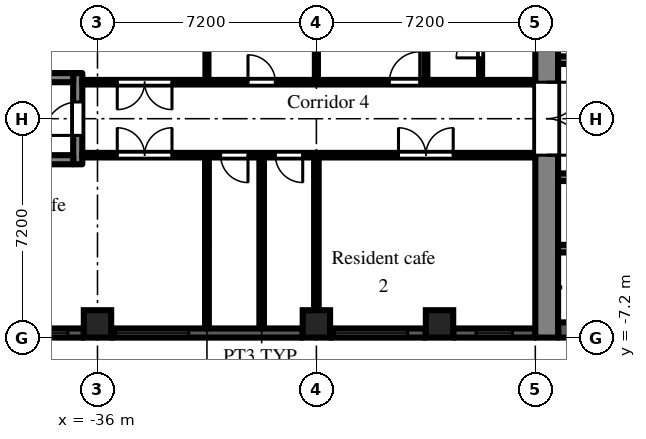
"""IFC4 building model, lengths in metres.
Left out: names, types, materials, properties, quantities, classifications, styles, units other than length and angle.
Written with IfcOpenShell. Run it as: python <this file> out.ifc"""

import sys

from ifc_helpers import new_model, si_unit, direction, frame, frame_2d, origin, origin_2d, place, context, subcontext, project, spatial, rectangle, extrude, element, fill, save


model = new_model("IFC4")
c1 = context("Model", 3, precision=1e-05, world=origin(), true_north=direction((0.0, 1.0)))
c2 = subcontext(c1, "Body", "Model", "MODEL_VIEW")
j1 = project(units=[si_unit("LENGTHUNIT", "METRE"), si_unit("PLANEANGLEUNIT", "RADIAN")], contexts=[c1])
p1 = place(None, origin())
s1 = spatial("IfcSite", under=j1, at=p1, CompositionType="ELEMENT")
p2 = place(p1, origin())
s2 = spatial("IfcBuilding", under=s1, at=p2, CompositionType="ELEMENT")
p3 = place(p2, frame((0.0, 0.0, 35.7)))
s3 = spatial("IfcBuildingStorey", under=s2, at=p3, CompositionType="ELEMENT", Elevation=35.7)
for number, where, z_axis, x_axis in (
    (1, (-36.0, -6.75, 0.0), (0.0, 0.0, 1.0), (1.0, 0.0, 0.0)),
    (2, (-28.8, -6.75, 0.0), (0.0, 0.0, 1.0), (1.0, 0.0, 0.0)),
    (3, (-24.75, -6.75, 0.0), (0.0, 0.0, 1.0), (1.0, 0.0, 0.0)),
):
    element("IfcColumn", number, at=place(p3, frame(where, z_axis=z_axis, x_axis=x_axis)), inside=s3, PredefinedType="COLUMN", context=c2, shape_type="SweptSolid", body=[
        extrude(rectangle(XDim=0.9, YDim=0.9, at=origin_2d()), origin(), (0.0, 0.0, 1.0), 3.0),
    ])
p4 = place(p3, frame((-38.7, -7.05, 0.0), z_axis=(0.0, 0.0, 1.0), x_axis=(1.0, 0.0, 0.0)))
e4 = element("IfcWall", 4, at=p4, inside=s3, PredefinedType="SOLIDWALL", context=c2, shape_type="SweptSolid", body=[
    extrude(rectangle(XDim=2.25, YDim=0.3, at=frame_2d((1.125, 0.0))), origin(), (0.0, 0.0, 1.0), 2.1),
])
p5 = place(p4, frame((0.525, 0.0, 0.2)))
e5 = element("IfcOpeningElement", 5, at=p5, cuts=e4, PredefinedType="OPENING", context=c2, shape_type="SweptSolid", body=[
    extrude(rectangle(XDim=1.2, YDim=1.85, at=frame_2d((0.6, 0.925))), frame((0.0, 0.16, 0.0), z_axis=(0.0, -1.0, 0.0), x_axis=(1.0, 0.0, 0.0)), (0.0, 0.0, 1.0), 0.32),
])
p6 = place(p3, frame((-35.55, -7.05, 0.0), z_axis=(0.0, 0.0, 1.0), x_axis=(1.0, 0.0, 0.0)))
e6 = element("IfcWall", 6, at=p6, inside=s3, PredefinedType="SOLIDWALL", context=c2, shape_type="SweptSolid", body=[
    extrude(rectangle(XDim=6.3, YDim=0.3, at=frame_2d((3.15, 0.0))), origin(), (0.0, 0.0, 1.0), 2.1),
])
p7 = place(p6, frame((0.15, 0.0, 0.2)))
e7 = element("IfcOpeningElement", 7, at=p7, cuts=e6, PredefinedType="OPENING", context=c2, shape_type="SweptSolid", body=[
    extrude(rectangle(XDim=2.4, YDim=1.85, at=frame_2d((1.2, 0.925))), frame((0.0, 0.16, 0.0), z_axis=(0.0, -1.0, 0.0), x_axis=(1.0, 0.0, 0.0)), (0.0, 0.0, 1.0), 0.32),
])
p8 = place(p3, frame((-28.35, -7.05, 0.0), z_axis=(0.0, 0.0, 1.0), x_axis=(1.0, 0.0, 0.0)))
e8 = element("IfcWall", 8, at=p8, inside=s3, PredefinedType="SOLIDWALL", context=c2, shape_type="SweptSolid", body=[
    extrude(rectangle(XDim=3.15, YDim=0.3, at=frame_2d((1.575, 0.0))), origin(), (0.0, 0.0, 1.0), 2.1),
])
p9 = place(p8, frame((0.15, 0.0, 0.2)))
e9 = element("IfcOpeningElement", 9, at=p9, cuts=e8, PredefinedType="OPENING", context=c2, shape_type="SweptSolid", body=[
    extrude(rectangle(XDim=2.4, YDim=1.85, at=frame_2d((1.2, 0.925))), frame((0.0, 0.16, 0.0), z_axis=(0.0, -1.0, 0.0), x_axis=(1.0, 0.0, 0.0)), (0.0, 0.0, 1.0), 0.32),
])
p10 = place(p3, frame((-24.3, -7.05, 0.0), z_axis=(0.0, 0.0, 1.0), x_axis=(1.0, 0.0, 0.0)))
e10 = element("IfcWall", 10, at=p10, inside=s3, PredefinedType="SOLIDWALL", context=c2, shape_type="SweptSolid", body=[
    extrude(rectangle(XDim=2.7, YDim=0.3, at=frame_2d((1.35, 0.0))), origin(), (0.0, 0.0, 1.0), 2.1),
])
p11 = place(p10, frame((0.75, 0.0, 0.2)))
e11 = element("IfcOpeningElement", 11, at=p11, cuts=e10, PredefinedType="OPENING", context=c2, shape_type="SweptSolid", body=[
    extrude(rectangle(XDim=1.2, YDim=1.85, at=frame_2d((0.6, 0.925))), frame((0.0, 0.16, 0.0), z_axis=(0.0, -1.0, 0.0), x_axis=(1.0, 0.0, 0.0)), (0.0, 0.0, 1.0), 0.32),
])
p12 = place(p3, frame((-21.225, -7.2, 0.0), z_axis=(0.0, 0.0, 1.0), x_axis=(0.0, 1.0, 0.0)))
e12 = element("IfcWall", 12, at=p12, inside=s3, PredefinedType="SHEAR", context=c2, shape_type="SweptSolid", body=[
    extrude(rectangle(XDim=14.4, YDim=0.75, at=frame_2d((7.2, 0.0))), origin(), (0.0, 0.0, 1.0), 2.575),
])
p13 = place(p12, frame((6.0, 0.0, 0.0)))
e13 = element("IfcOpeningElement", 13, at=p13, cuts=e12, PredefinedType="OPENING", context=c2, shape_type="SweptSolid", body=[
    extrude(rectangle(XDim=2.4, YDim=2.2, at=frame_2d((1.2, 1.1))), frame((0.0, 0.385, 0.0), z_axis=(0.0, -1.0, 0.0), x_axis=(1.0, 0.0, 0.0)), (0.0, 0.0, 1.0), 0.77),
])
p14 = place(p3, frame((-7.9, 1.925, 0.0), z_axis=(0.0, 0.0, 1.0), x_axis=(-1.0, 0.0, 0.0)))
e14 = element("IfcWall", 14, at=p14, inside=s3, PredefinedType="SHEAR", context=c2, shape_type="SweptSolid", body=[
    extrude(rectangle(XDim=12.95, YDim=0.25, at=frame_2d((6.475, 0.0))), origin(), (0.0, 0.0, 1.0), 2.575),
])
p15 = place(p14, frame((0.525, 0.0, 0.0)))
e15 = element("IfcOpeningElement", 15, at=p15, cuts=e14, PredefinedType="OPENING", context=c2, shape_type="SweptSolid", body=[
    extrude(rectangle(XDim=0.9, YDim=2.1, at=frame_2d((0.45, 1.05))), frame((0.0, 0.135, 0.0), z_axis=(0.0, -1.0, 0.0), x_axis=(1.0, 0.0, 0.0)), (0.0, 0.0, 1.0), 0.27),
])
p16 = place(p14, frame((2.625, 0.0, 0.0)))
e16 = element("IfcOpeningElement", 16, at=p16, cuts=e14, PredefinedType="OPENING", context=c2, shape_type="SweptSolid", body=[
    extrude(rectangle(XDim=1.1, YDim=2.1, at=frame_2d((0.55, 1.05))), frame((0.0, 0.135, 0.0), z_axis=(0.0, -1.0, 0.0), x_axis=(1.0, 0.0, 0.0)), (0.0, 0.0, 1.0), 0.27),
])
p17 = place(p14, frame((7.125, 0.0, 0.0)))
e17 = element("IfcOpeningElement", 17, at=p17, cuts=e14, PredefinedType="OPENING", context=c2, shape_type="SweptSolid", body=[
    extrude(rectangle(XDim=0.9, YDim=2.1, at=frame_2d((0.45, 1.05))), frame((0.0, 0.135, 0.0), z_axis=(0.0, -1.0, 0.0), x_axis=(1.0, 0.0, 0.0)), (0.0, 0.0, 1.0), 0.27),
])
p18 = place(p3, frame((-7.9, -6.95, 0.0), z_axis=(0.0, 0.0, 1.0), x_axis=(-1.0, 0.0, 0.0)))
e18 = element("IfcWall", 18, at=p18, inside=s3, PredefinedType="SHEAR", context=c2, shape_type="SweptSolid", body=[
    extrude(rectangle(XDim=12.95, YDim=0.5, at=frame_2d((6.475, 0.0))), origin(), (0.0, 0.0, 1.0), 2.575),
])
p19 = place(p3, frame((-7.9, -1.925, 0.0), z_axis=(0.0, 0.0, 1.0), x_axis=(-1.0, 0.0, 0.0)))
e19 = element("IfcWall", 19, at=p19, inside=s3, PredefinedType="SHEAR", context=c2, shape_type="SweptSolid", body=[
    extrude(rectangle(XDim=12.95, YDim=0.25, at=frame_2d((6.475, 0.0))), origin(), (0.0, 0.0, 1.0), 2.575),
])
p20 = place(p19, frame((4.825, 0.0, 0.0)))
e20 = element("IfcOpeningElement", 20, at=p20, cuts=e19, PredefinedType="OPENING", context=c2, shape_type="SweptSolid", body=[
    extrude(rectangle(XDim=1.1, YDim=2.1, at=frame_2d((0.55, 1.05))), frame((0.0, 0.135, 0.0), z_axis=(0.0, -1.0, 0.0), x_axis=(1.0, 0.0, 0.0)), (0.0, 0.0, 1.0), 0.27),
])
p21 = place(p19, frame((7.025, 0.0, 0.0)))
e21 = element("IfcOpeningElement", 21, at=p21, cuts=e19, PredefinedType="OPENING", context=c2, shape_type="SweptSolid", body=[
    extrude(rectangle(XDim=1.1, YDim=2.1, at=frame_2d((0.55, 1.05))), frame((0.0, 0.135, 0.0), z_axis=(0.0, -1.0, 0.0), x_axis=(1.0, 0.0, 0.0)), (0.0, 0.0, 1.0), 0.27),
])
p22 = place(p19, frame((9.225, 0.0, 0.0)))
e22 = element("IfcOpeningElement", 22, at=p22, cuts=e19, PredefinedType="OPENING", context=c2, shape_type="SweptSolid", body=[
    extrude(rectangle(XDim=1.1, YDim=2.1, at=frame_2d((0.55, 1.05))), frame((0.0, 0.135, 0.0), z_axis=(0.0, -1.0, 0.0), x_axis=(1.0, 0.0, 0.0)), (0.0, 0.0, 1.0), 0.27),
])
p23 = place(p19, frame((0.525, 0.0, 0.0)))
e23 = element("IfcOpeningElement", 23, at=p23, cuts=e19, PredefinedType="OPENING", context=c2, shape_type="SweptSolid", body=[
    extrude(rectangle(XDim=0.9, YDim=2.1, at=frame_2d((0.45, 1.05))), frame((0.0, 0.135, 0.0), z_axis=(0.0, -1.0, 0.0), x_axis=(1.0, 0.0, 0.0)), (0.0, 0.0, 1.0), 0.27),
])
p24 = place(p19, frame((2.625, 0.0, 0.0)))
e24 = element("IfcOpeningElement", 24, at=p24, cuts=e19, PredefinedType="OPENING", context=c2, shape_type="SweptSolid", body=[
    extrude(rectangle(XDim=1.1, YDim=2.1, at=frame_2d((0.55, 1.05))), frame((0.0, 0.135, 0.0), z_axis=(0.0, -1.0, 0.0), x_axis=(1.0, 0.0, 0.0)), (0.0, 0.0, 1.0), 0.27),
])
p25 = place(p3, frame((-12.3, -4.275, 0.0), z_axis=(0.0, 0.0, 1.0), x_axis=(-1.0, 0.0, 0.0)))
e25 = element("IfcWall", 25, at=p25, inside=s3, PredefinedType="SHEAR", context=c2, shape_type="SweptSolid", body=[
    extrude(rectangle(XDim=8.55, YDim=0.25, at=frame_2d((4.275, 0.0))), origin(), (0.0, 0.0, 1.0), 2.575),
])
p26 = place(p3, frame((-36.65, -1.5, 0.0), z_axis=(0.0, 0.0, 1.0), x_axis=(0.0, 1.0, 0.0)))
e26 = element("IfcWall", 26, at=p26, inside=s3, PredefinedType="SHEAR", context=c2, shape_type="SweptSolid", body=[
    extrude(rectangle(XDim=3.0, YDim=0.3, at=frame_2d((1.5, 0.0))), origin(), (0.0, 0.0, 1.0), 2.575),
])
p27 = place(p26, frame((0.95, 0.0, 0.0)))
e27 = element("IfcOpeningElement", 27, at=p27, cuts=e26, PredefinedType="OPENING", context=c2, shape_type="SweptSolid", body=[
    extrude(rectangle(XDim=1.1, YDim=2.1, at=frame_2d((0.55, 1.05))), frame((0.0, 0.16, 0.0), z_axis=(0.0, -1.0, 0.0), x_axis=(1.0, 0.0, 0.0)), (0.0, 0.0, 1.0), 0.32),
])
for number, where, z_axis, x_axis in (
    (28, (-36.8, -1.35, 0.0), (0.0, 0.0, 1.0), (-1.0, 0.0, 0.0)),
    (29, (-36.8, 1.35, 0.0), (0.0, 0.0, 1.0), (-1.0, 0.0, 0.0)),
):
    element("IfcWall", number, at=place(p3, frame(where, z_axis=z_axis, x_axis=x_axis)), inside=s3, PredefinedType="SHEAR", context=c2, shape_type="SweptSolid", body=[
        extrude(rectangle(XDim=5.8, YDim=0.3, at=frame_2d((2.9, 0.0))), origin(), (0.0, 0.0, 1.0), 2.575),
    ])
p28 = place(p3, frame((-36.5, -1.2, 0.0), z_axis=(0.0, 0.0, 1.0), x_axis=(1.0, 0.0, 0.0)))
e30 = element("IfcWall", 30, at=p28, inside=s3, PredefinedType="PARTITIONING", context=c2, shape_type="SweptSolid", body=[
    extrude(rectangle(XDim=14.9, YDim=0.15, at=frame_2d((7.45, 0.0))), origin(), (0.0, 0.0, 1.0), 2.575),
])
p29 = place(p28, frame((10.4, 0.0, 0.0)))
e31 = element("IfcOpeningElement", 31, at=p29, cuts=e30, PredefinedType="OPENING", context=c2, shape_type="SweptSolid", body=[
    extrude(rectangle(XDim=1.8, YDim=2.1, at=frame_2d((0.9, 1.05))), frame((0.0, 0.085, 0.0), z_axis=(0.0, -1.0, 0.0), x_axis=(1.0, 0.0, 0.0)), (0.0, 0.0, 1.0), 0.17),
])
p30 = place(p28, frame((6.35, 0.0, 0.0)))
e32 = element("IfcOpeningElement", 32, at=p30, cuts=e30, PredefinedType="OPENING", context=c2, shape_type="SweptSolid", body=[
    extrude(rectangle(XDim=0.9, YDim=2.1, at=frame_2d((0.45, 1.05))), frame((0.0, 0.085, 0.0), z_axis=(0.0, -1.0, 0.0), x_axis=(1.0, 0.0, 0.0)), (0.0, 0.0, 1.0), 0.17),
])
p31 = place(p28, frame((4.55, 0.0, 0.0)))
e33 = element("IfcOpeningElement", 33, at=p31, cuts=e30, PredefinedType="OPENING", context=c2, shape_type="SweptSolid", body=[
    extrude(rectangle(XDim=0.9, YDim=2.1, at=frame_2d((0.45, 1.05))), frame((0.0, 0.085, 0.0), z_axis=(0.0, -1.0, 0.0), x_axis=(1.0, 0.0, 0.0)), (0.0, 0.0, 1.0), 0.17),
])
p32 = place(p28, frame((1.15, 0.0, 0.0)))
e34 = element("IfcOpeningElement", 34, at=p32, cuts=e30, PredefinedType="OPENING", context=c2, shape_type="SweptSolid", body=[
    extrude(rectangle(XDim=1.8, YDim=2.1, at=frame_2d((0.9, 1.05))), frame((0.0, 0.085, 0.0), z_axis=(0.0, -1.0, 0.0), x_axis=(1.0, 0.0, 0.0)), (0.0, 0.0, 1.0), 0.17),
])
p33 = place(p3, frame((-36.5, 1.2, 0.0), z_axis=(0.0, 0.0, 1.0), x_axis=(1.0, 0.0, 0.0)))
e35 = element("IfcWall", 35, at=p33, inside=s3, PredefinedType="PARTITIONING", context=c2, shape_type="SweptSolid", body=[
    extrude(rectangle(XDim=14.9, YDim=0.15, at=frame_2d((7.45, 0.0))), origin(), (0.0, 0.0, 1.0), 2.575),
])
p34 = place(p33, frame((10.1, 0.0, 0.0)))
e36 = element("IfcOpeningElement", 36, at=p34, cuts=e35, PredefinedType="OPENING", context=c2, shape_type="SweptSolid", body=[
    extrude(rectangle(XDim=1.0, YDim=2.1, at=frame_2d((0.5, 1.05))), frame((0.0, 0.085, 0.0), z_axis=(0.0, -1.0, 0.0), x_axis=(1.0, 0.0, 0.0)), (0.0, 0.0, 1.0), 0.17),
])
p35 = place(p33, frame((5.45, 0.0, 0.0)))
e37 = element("IfcOpeningElement", 37, at=p35, cuts=e35, PredefinedType="OPENING", context=c2, shape_type="SweptSolid", body=[
    extrude(rectangle(XDim=0.9, YDim=2.1, at=frame_2d((0.45, 1.05))), frame((0.0, 0.085, 0.0), z_axis=(0.0, -1.0, 0.0), x_axis=(1.0, 0.0, 0.0)), (0.0, 0.0, 1.0), 0.17),
])
p36 = place(p33, frame((1.15, 0.0, 0.0)))
e38 = element("IfcOpeningElement", 38, at=p36, cuts=e35, PredefinedType="OPENING", context=c2, shape_type="SweptSolid", body=[
    extrude(rectangle(XDim=1.8, YDim=2.1, at=frame_2d((0.9, 1.05))), frame((0.0, 0.085, 0.0), z_axis=(0.0, -1.0, 0.0), x_axis=(1.0, 0.0, 0.0)), (0.0, 0.0, 1.0), 0.17),
])
p37 = place(p3, frame((-32.4, -6.9, 0.0), z_axis=(0.0, 0.0, 1.0), x_axis=(0.0, 1.0, 0.0)))
e39 = element("IfcWall", 39, at=p37, inside=s3, PredefinedType="PARTITIONING", context=c2, shape_type="SweptSolid", body=[
    extrude(rectangle(XDim=5.625, YDim=0.125, at=frame_2d((2.812, 0.0))), origin(), (0.0, 0.0, 1.0), 2.575),
])
p38 = place(p3, frame((-32.4, 1.275, 0.0), z_axis=(0.0, 0.0, 1.0), x_axis=(0.0, 1.0, 0.0)))
e40 = element("IfcWall", 40, at=p38, inside=s3, PredefinedType="PARTITIONING", context=c2, shape_type="SweptSolid", body=[
    extrude(rectangle(XDim=5.625, YDim=0.1, at=frame_2d((2.812, 0.0))), origin(), (0.0, 0.0, 1.0), 2.575),
])
for number, where, z_axis, x_axis in (
    (41, (-30.6, -6.9, 0.0), (0.0, 0.0, 1.0), (0.0, 1.0, 0.0)),
    (42, (-28.8, -6.9, 0.0), (0.0, 0.0, 1.0), (0.0, 1.0, 0.0)),
):
    element("IfcWall", number, at=place(p3, frame(where, z_axis=z_axis, x_axis=x_axis)), inside=s3, PredefinedType="PARTITIONING", context=c2, shape_type="SweptSolid", body=[
        extrude(rectangle(XDim=5.625, YDim=0.15, at=frame_2d((2.812, 0.0))), origin(), (0.0, 0.0, 1.0), 2.575),
    ])
p39 = place(p3, frame((-28.8, 1.275, 0.0), z_axis=(0.0, 0.0, 1.0), x_axis=(0.0, 1.0, 0.0)))
e43 = element("IfcWall", 43, at=p39, inside=s3, PredefinedType="PARTITIONING", context=c2, shape_type="SweptSolid", body=[
    extrude(rectangle(XDim=5.625, YDim=0.1, at=frame_2d((2.812, 0.0))), origin(), (0.0, 0.0, 1.0), 2.575),
])
p40 = place(p3, frame((-25.2, 1.275, 0.0), z_axis=(0.0, 0.0, 1.0), x_axis=(0.0, 1.0, 0.0)))
e44 = element("IfcWall", 44, at=p40, inside=s3, PredefinedType="PARTITIONING", context=c2, shape_type="SweptSolid", body=[
    extrude(rectangle(XDim=2.375, YDim=0.1, at=frame_2d((1.188, 0.0))), origin(), (0.0, 0.0, 1.0), 2.575),
])
p41 = place(p3, frame((-23.4, 1.275, 0.0), z_axis=(0.0, 0.0, 1.0), x_axis=(0.0, 1.0, 0.0)))
e45 = element("IfcWall", 45, at=p41, inside=s3, PredefinedType="PARTITIONING", context=c2, shape_type="SweptSolid", body=[
    extrude(rectangle(XDim=2.375, YDim=0.1, at=frame_2d((1.188, 0.0))), origin(), (0.0, 0.0, 1.0), 2.575),
])
p42 = place(p41, frame((0.725, 0.0, 0.0)))
e46 = element("IfcOpeningElement", 46, at=p42, cuts=e45, PredefinedType="OPENING", context=c2, shape_type="SweptSolid", body=[
    extrude(rectangle(XDim=0.8, YDim=2.1, at=frame_2d((0.4, 1.05))), frame((0.0, 0.06, 0.0), z_axis=(0.0, -1.0, 0.0), x_axis=(1.0, 0.0, 0.0)), (0.0, 0.0, 1.0), 0.12),
])
p43 = place(p5, origin())
e47 = element("IfcWindow", 47, at=p43, inside=s3, PartitioningType="SINGLE_PANEL", PredefinedType="WINDOW", context=c2, shape_type="SweptSolid", body=[
    extrude(rectangle(XDim=1.2, YDim=1.85, at=frame_2d((0.6, 0.925))), frame((0.0, 0.03, 0.0), z_axis=(0.0, -1.0, 0.0), x_axis=(1.0, 0.0, 0.0)), (0.0, 0.0, 1.0), 0.06),
])
fill(e5, e47)
p44 = place(p7, origin())
e48 = element("IfcWindow", 48, at=p44, inside=s3, PartitioningType="SINGLE_PANEL", PredefinedType="WINDOW", context=c2, shape_type="SweptSolid", body=[
    extrude(rectangle(XDim=2.4, YDim=1.85, at=frame_2d((1.2, 0.925))), frame((0.0, 0.03, 0.0), z_axis=(0.0, -1.0, 0.0), x_axis=(1.0, 0.0, 0.0)), (0.0, 0.0, 1.0), 0.06),
])
fill(e7, e48)
p45 = place(p9, origin())
e49 = element("IfcWindow", 49, at=p45, inside=s3, PartitioningType="SINGLE_PANEL", PredefinedType="WINDOW", context=c2, shape_type="SweptSolid", body=[
    extrude(rectangle(XDim=2.4, YDim=1.85, at=frame_2d((1.2, 0.925))), frame((0.0, 0.03, 0.0), z_axis=(0.0, -1.0, 0.0), x_axis=(1.0, 0.0, 0.0)), (0.0, 0.0, 1.0), 0.06),
])
fill(e9, e49)
p46 = place(p11, origin())
e50 = element("IfcWindow", 50, at=p46, inside=s3, PartitioningType="SINGLE_PANEL", PredefinedType="WINDOW", context=c2, shape_type="SweptSolid", body=[
    extrude(rectangle(XDim=1.2, YDim=1.85, at=frame_2d((0.6, 0.925))), frame((0.0, 0.03, 0.0), z_axis=(0.0, -1.0, 0.0), x_axis=(1.0, 0.0, 0.0)), (0.0, 0.0, 1.0), 0.06),
])
fill(e11, e50)
p47 = place(p13, frame((2.4, 0.0, 0.0), z_axis=(0.0, 0.0, 1.0), x_axis=(-1.0, 0.0, 0.0)))
e51 = element("IfcDoor", 51, at=p47, inside=s3, OperationType="DOUBLE_DOOR_DOUBLE_SWING", PredefinedType="DOOR", context=c2, shape_type="SweptSolid", body=[
    extrude(rectangle(XDim=2.4, YDim=2.2, at=frame_2d((1.2, 1.1))), frame((0.0, 0.025, 0.0), z_axis=(0.0, -1.0, 0.0), x_axis=(1.0, 0.0, 0.0)), (0.0, 0.0, 1.0), 0.05),
])
fill(e13, e51)
p48 = place(p27, origin())
e52 = element("IfcDoor", 52, at=p48, inside=s3, OperationType="SINGLE_SWING_LEFT", PredefinedType="DOOR", context=c2, shape_type="SweptSolid", body=[
    extrude(rectangle(XDim=1.1, YDim=2.1, at=frame_2d((0.55, 1.05))), frame((0.0, 0.025, 0.0), z_axis=(0.0, -1.0, 0.0), x_axis=(1.0, 0.0, 0.0)), (0.0, 0.0, 1.0), 0.05),
])
fill(e27, e52)
p49 = place(p29, origin())
e53 = element("IfcDoor", 53, at=p49, inside=s3, OperationType="DOUBLE_DOOR_DOUBLE_SWING", PredefinedType="DOOR", context=c2, shape_type="SweptSolid", body=[
    extrude(rectangle(XDim=1.8, YDim=2.1, at=frame_2d((0.9, 1.05))), frame((0.0, 0.025, 0.0), z_axis=(0.0, -1.0, 0.0), x_axis=(1.0, 0.0, 0.0)), (0.0, 0.0, 1.0), 0.05),
])
fill(e31, e53)
p50 = place(p30, frame((0.9, 0.0, 0.0), z_axis=(0.0, 0.0, 1.0), x_axis=(-1.0, 0.0, 0.0)))
e54 = element("IfcDoor", 54, at=p50, inside=s3, OperationType="SINGLE_SWING_LEFT", PredefinedType="DOOR", context=c2, shape_type="SweptSolid", body=[
    extrude(rectangle(XDim=0.9, YDim=2.1, at=frame_2d((0.45, 1.05))), frame((0.0, 0.025, 0.0), z_axis=(0.0, -1.0, 0.0), x_axis=(1.0, 0.0, 0.0)), (0.0, 0.0, 1.0), 0.05),
])
fill(e32, e54)
p51 = place(p31, frame((0.9, 0.0, 0.0), z_axis=(0.0, 0.0, 1.0), x_axis=(-1.0, 0.0, 0.0)))
e55 = element("IfcDoor", 55, at=p51, inside=s3, OperationType="SINGLE_SWING_LEFT", PredefinedType="DOOR", context=c2, shape_type="SweptSolid", body=[
    extrude(rectangle(XDim=0.9, YDim=2.1, at=frame_2d((0.45, 1.05))), frame((0.0, 0.025, 0.0), z_axis=(0.0, -1.0, 0.0), x_axis=(1.0, 0.0, 0.0)), (0.0, 0.0, 1.0), 0.05),
])
fill(e33, e55)
p52 = place(p32, origin())
e56 = element("IfcDoor", 56, at=p52, inside=s3, OperationType="DOUBLE_DOOR_DOUBLE_SWING", PredefinedType="DOOR", context=c2, shape_type="SweptSolid", body=[
    extrude(rectangle(XDim=1.8, YDim=2.1, at=frame_2d((0.9, 1.05))), frame((0.0, 0.025, 0.0), z_axis=(0.0, -1.0, 0.0), x_axis=(1.0, 0.0, 0.0)), (0.0, 0.0, 1.0), 0.05),
])
fill(e34, e56)
p53 = place(p42, origin())
e57 = element("IfcDoor", 57, at=p53, inside=s3, OperationType="SINGLE_SWING_LEFT", PredefinedType="DOOR", context=c2, shape_type="SweptSolid", body=[
    extrude(rectangle(XDim=0.8, YDim=2.1, at=frame_2d((0.4, 1.05))), frame((0.0, 0.025, 0.0), z_axis=(0.0, -1.0, 0.0), x_axis=(1.0, 0.0, 0.0)), (0.0, 0.0, 1.0), 0.05),
])
fill(e46, e57)
p54 = place(p34, origin())
e58 = element("IfcDoor", 58, at=p54, inside=s3, OperationType="SINGLE_SWING_RIGHT", PredefinedType="DOOR", context=c2, shape_type="SweptSolid", body=[
    extrude(rectangle(XDim=1.0, YDim=2.1, at=frame_2d((0.5, 1.05))), frame((0.0, 0.025, 0.0), z_axis=(0.0, -1.0, 0.0), x_axis=(1.0, 0.0, 0.0)), (0.0, 0.0, 1.0), 0.05),
])
fill(e36, e58)
p55 = place(p35, origin())
e59 = element("IfcDoor", 59, at=p55, inside=s3, OperationType="SINGLE_SWING_LEFT", PredefinedType="DOOR", context=c2, shape_type="SweptSolid", body=[
    extrude(rectangle(XDim=0.9, YDim=2.1, at=frame_2d((0.45, 1.05))), frame((0.0, 0.025, 0.0), z_axis=(0.0, -1.0, 0.0), x_axis=(1.0, 0.0, 0.0)), (0.0, 0.0, 1.0), 0.05),
])
fill(e37, e59)
p56 = place(p36, frame((1.8, 0.0, 0.0), z_axis=(0.0, 0.0, 1.0), x_axis=(-1.0, 0.0, 0.0)))
e60 = element("IfcDoor", 60, at=p56, inside=s3, OperationType="DOUBLE_DOOR_DOUBLE_SWING", PredefinedType="DOOR", context=c2, shape_type="SweptSolid", body=[
    extrude(rectangle(XDim=1.8, YDim=2.1, at=frame_2d((0.9, 1.05))), frame((0.0, 0.025, 0.0), z_axis=(0.0, -1.0, 0.0), x_axis=(1.0, 0.0, 0.0)), (0.0, 0.0, 1.0), 0.05),
])
fill(e38, e60)
save(model, sys.argv[1])
